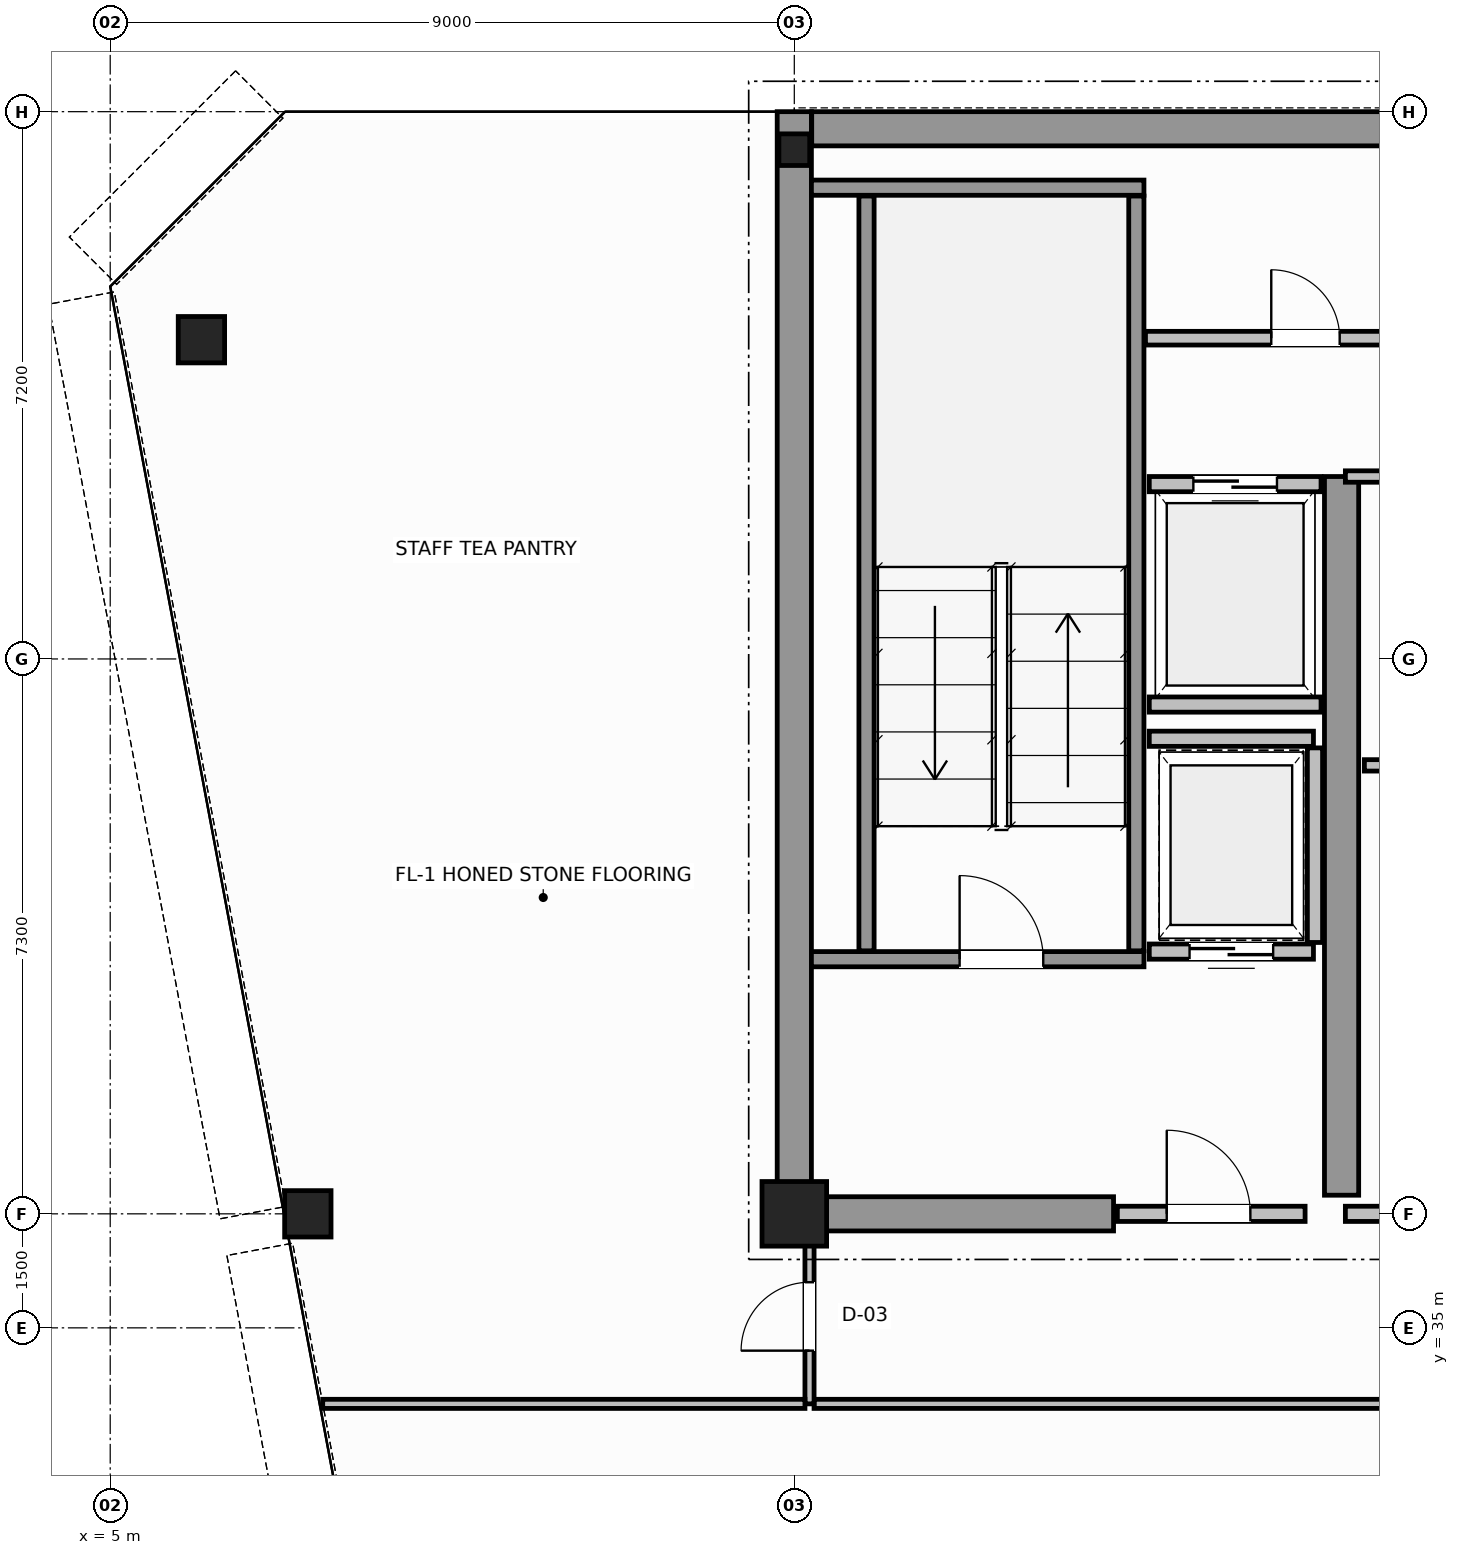
"""IFC4 building model, lengths in metres.
Left out: names, types, materials, properties, quantities, classifications, styles, units other than length and angle.
Written with IfcOpenShell. Run it as: python <this file> out.ifc"""

import sys

from ifc_helpers import new_model, si_unit, direction, frame, frame_2d, origin, origin_2d, place, context, subcontext, project, spatial, rectangle, hollow_circle, i_section, extrude, source, transform, mapped, element, fill, save


model = new_model("IFC4")
c1 = context("Model", 3, precision=1e-05, world=origin(), true_north=direction((0.0, 1.0)))
c2 = subcontext(c1, "Body", "Model", "MODEL_VIEW")
j1 = project(units=[si_unit("LENGTHUNIT", "METRE"), si_unit("PLANEANGLEUNIT", "RADIAN")], contexts=[c1])
p1 = place(None, origin())
s1 = spatial("IfcSite", under=j1, at=p1, CompositionType="ELEMENT")
p2 = place(p1, origin())
s2 = spatial("IfcBuilding", under=s1, at=p2, CompositionType="ELEMENT")
p3 = place(p2, frame((0.0, 0.0, 295.4)))
s3 = spatial("IfcBuildingStorey", under=s2, at=p3, CompositionType="ELEMENT", Elevation=295.4)
m1 = source(origin(), c2, "Body", "SweptSolid", [
    extrude(rectangle(XDim=0.85, YDim=0.85, at=origin_2d()), origin(), (0.0, 0.0, 1.0), 3.8),
])
p4 = place(p3, frame((14.0, 36.5, 0.0), z_axis=(0.0, 0.0, 1.0), x_axis=(1.0, 0.0, 0.0)))
e1 = element("IfcColumn", 1, at=p4, inside=s3, PredefinedType="COLUMN", context=c2, shape_type="MappedRepresentation", body=[
    mapped(m1, transform((0.0, 0.0, 0.0), scale=1.0)),
])
m2 = source(origin(), c2, "Body", "SweptSolid", [
    extrude(i_section(OverallWidth=0.406, OverallDepth=0.416, WebThickness=0.03, FlangeThickness=0.042, FilletRadius=0.015, at=origin_2d()), origin(), (0.0, 0.0, 1.0), 3.8),
])
p5 = place(p3, frame((14.0, 50.5, 0.0), z_axis=(0.0, 0.0, 1.0), x_axis=(1.0, 0.0, 0.0)))
e2 = element("IfcColumn", 2, at=p5, inside=s3, PredefinedType="COLUMN", context=c2, shape_type="MappedRepresentation", body=[
    mapped(m2, transform((0.0, 0.0, 0.0), scale=1.0)),
])
m3 = source(origin(), c2, "Body", "SweptSolid", [
    extrude(hollow_circle(Radius=0.305, WallThickness=0.03, at=origin_2d()), origin(), (0.0, 0.0, 1.0), 3.8),
])
for number, where, z_axis, x_axis in (
    (3, (6.2, 48.0, 0.0), (0.0, 0.0, 1.0), (1.0, 0.0, 0.0)),
    (4, (7.6, 36.5, 0.0), (0.0, 0.0, 1.0), (1.0, 0.0, 0.0)),
):
    element("IfcColumn", number, at=place(p3, frame(where, z_axis=z_axis, x_axis=x_axis)), inside=s3, PredefinedType="COLUMN", context=c2, shape_type="MappedRepresentation", body=[
        mapped(m3, transform((0.0, 0.0, 0.0), scale=1.0)),
    ])
p6 = place(p3, frame((14.229, 50.775, 0.0), z_axis=(0.0, 0.0, 1.0), x_axis=(1.0, 0.0, 0.0)))
e5 = element("IfcWall", 5, at=p6, inside=s3, PredefinedType="SHEAR", context=c2, shape_type="SweptSolid", body=[
    extrude(rectangle(XDim=19.769, YDim=0.45, at=frame_2d((9.885, 0.0))), origin(), (0.0, 0.0, 1.0), 3.8),
])
p7 = place(p3, frame((14.0, 36.5, 0.0), z_axis=(0.0, 0.0, 1.0), x_axis=(0.0, 1.0, 0.0)))
e6 = element("IfcWall", 6, at=p7, inside=s3, PredefinedType="SHEAR", context=c2, shape_type="SweptSolid", body=[
    extrude(rectangle(XDim=14.5, YDim=0.45, at=frame_2d((7.25, 0.0))), origin(), (0.0, 0.0, 1.0), 3.8),
])
p8 = place(p3, frame((14.245, 36.5, 0.0), z_axis=(0.0, 0.0, 1.0), x_axis=(1.0, 0.0, 0.0)))
e7 = element("IfcWall", 7, at=p8, inside=s3, PredefinedType="SHEAR", context=c2, shape_type="SweptSolid", body=[
    extrude(rectangle(XDim=3.955, YDim=0.45, at=frame_2d((1.978, 0.0))), origin(), (0.0, 0.0, 1.0), 2.58),
])
p9 = place(p3, frame((21.2, 36.745, 0.0), z_axis=(0.0, 0.0, 1.0), x_axis=(0.0, 1.0, 0.0)))
e8 = element("IfcWall", 8, at=p9, inside=s3, PredefinedType="SHEAR", context=c2, shape_type="SweptSolid", body=[
    extrude(rectangle(XDim=9.455, YDim=0.45, at=frame_2d((4.728, 0.0))), origin(), (0.0, 0.0, 1.0), 3.8),
])
p10 = place(p3, frame((14.225, 39.85, 0.0), z_axis=(0.0, 0.0, 1.0), x_axis=(1.0, 0.0, 0.0)))
e9 = element("IfcWall", 9, at=p10, inside=s3, PredefinedType="SOLIDWALL", context=c2, shape_type="SweptSolid", body=[
    extrude(rectangle(XDim=4.375, YDim=0.2, at=frame_2d((2.188, 0.0))), origin(), (0.0, 0.0, 1.0), 3.8),
])
p11 = place(p10, frame((1.95, 0.0, 0.0)))
e10 = element("IfcOpeningElement", 10, at=p11, cuts=e9, PredefinedType="OPENING", context=c2, shape_type="SweptSolid", body=[
    extrude(rectangle(XDim=1.1, YDim=2.15, at=frame_2d((0.55, 1.075))), frame((0.0, 0.11, 0.0), z_axis=(0.0, -1.0, 0.0), x_axis=(1.0, 0.0, 0.0)), (0.0, 0.0, 1.0), 0.22),
])
p12 = place(p3, frame((14.225, 50.0, 0.0), z_axis=(0.0, 0.0, 1.0), x_axis=(1.0, 0.0, 0.0)))
e11 = element("IfcWall", 11, at=p12, inside=s3, PredefinedType="SOLIDWALL", context=c2, shape_type="SweptSolid", body=[
    extrude(rectangle(XDim=4.375, YDim=0.2, at=frame_2d((2.188, 0.0))), origin(), (0.0, 0.0, 1.0), 3.8),
])
for number, where, z_axis, x_axis in (
    (12, (14.95, 39.96, 0.0), (0.0, 0.0, 1.0), (0.0, 1.0, 0.0)),
    (13, (18.5, 39.96, 0.0), (0.0, 0.0, 1.0), (0.0, 1.0, 0.0)),
):
    element("IfcWall", number, at=place(p3, frame(where, z_axis=z_axis, x_axis=x_axis)), inside=s3, PredefinedType="SOLIDWALL", context=c2, shape_type="SweptSolid", body=[
        extrude(rectangle(XDim=9.93, YDim=0.2, at=frame_2d((4.965, 0.0))), origin(), (0.0, 0.0, 1.0), 3.8),
    ])
p13 = place(p3, frame((18.25, 36.5, 0.0), z_axis=(0.0, 0.0, 1.0), x_axis=(1.0, 0.0, 0.0)))
e14 = element("IfcWall", 14, at=p13, inside=s3, PredefinedType="SOLIDWALL", context=c2, shape_type="SweptSolid", body=[
    extrude(rectangle(XDim=2.47, YDim=0.2, at=frame_2d((1.235, 0.0))), origin(), (0.0, 0.0, 1.0), 2.57),
])
p14 = place(p13, frame((0.65, 0.0, 0.0)))
e15 = element("IfcOpeningElement", 15, at=p14, cuts=e14, PredefinedType="OPENING", context=c2, shape_type="SweptSolid", body=[
    extrude(rectangle(XDim=1.1, YDim=2.15, at=frame_2d((0.55, 1.075))), frame((0.0, 0.11, 0.0), z_axis=(0.0, -1.0, 0.0), x_axis=(1.0, 0.0, 0.0)), (0.0, 0.0, 1.0), 0.22),
])
p15 = place(p3, frame((18.67, 46.1, 0.0), z_axis=(0.0, 0.0, 1.0), x_axis=(1.0, 0.0, 0.0)))
e16 = element("IfcWall", 16, at=p15, inside=s3, PredefinedType="SOLIDWALL", context=c2, shape_type="SweptSolid", body=[
    extrude(rectangle(XDim=2.26, YDim=0.2, at=frame_2d((1.13, 0.0))), origin(), (0.0, 0.0, 1.0), 3.58),
])
p16 = place(p15, frame((0.58, 0.0, 0.0)))
e17 = element("IfcOpeningElement", 17, at=p16, cuts=e16, PredefinedType="OPENING", context=c2, shape_type="SweptSolid", body=[
    extrude(rectangle(XDim=1.1, YDim=2.15, at=frame_2d((0.55, 1.075))), frame((0.0, 0.11, 0.0), z_axis=(0.0, -1.0, 0.0), x_axis=(1.0, 0.0, 0.0)), (0.0, 0.0, 1.0), 0.22),
])
p17 = place(p3, frame((18.67, 43.2, 0.0), z_axis=(0.0, 0.0, 1.0), x_axis=(1.0, 0.0, 0.0)))
e18 = element("IfcWall", 18, at=p17, inside=s3, PredefinedType="SOLIDWALL", context=c2, shape_type="SweptSolid", body=[
    extrude(rectangle(XDim=2.26, YDim=0.2, at=frame_2d((1.13, 0.0))), origin(), (0.0, 0.0, 1.0), 3.58),
])
p18 = place(p3, frame((18.67, 39.95, 0.0), z_axis=(0.0, 0.0, 1.0), x_axis=(1.0, 0.0, 0.0)))
e19 = element("IfcWall", 19, at=p18, inside=s3, PredefinedType="SOLIDWALL", context=c2, shape_type="SweptSolid", body=[
    extrude(rectangle(XDim=2.16, YDim=0.2, at=frame_2d((1.08, 0.0))), origin(), (0.0, 0.0, 1.0), 3.58),
])
p19 = place(p18, frame((0.53, 0.0, 0.0)))
e20 = element("IfcOpeningElement", 20, at=p19, cuts=e19, PredefinedType="OPENING", context=c2, shape_type="SweptSolid", body=[
    extrude(rectangle(XDim=1.1, YDim=2.15, at=frame_2d((0.55, 1.075))), frame((0.0, 0.11, 0.0), z_axis=(0.0, -1.0, 0.0), x_axis=(1.0, 0.0, 0.0)), (0.0, 0.0, 1.0), 0.22),
])
p20 = place(p3, frame((18.67, 42.75, 0.0), z_axis=(0.0, 0.0, 1.0), x_axis=(1.0, 0.0, 0.0)))
e21 = element("IfcWall", 21, at=p20, inside=s3, PredefinedType="SOLIDWALL", context=c2, shape_type="SweptSolid", body=[
    extrude(rectangle(XDim=2.16, YDim=0.2, at=frame_2d((1.08, 0.0))), origin(), (0.0, 0.0, 1.0), 3.58),
])
p21 = place(p3, frame((20.85, 40.07, 0.0), z_axis=(0.0, 0.0, 1.0), x_axis=(0.0, 1.0, 0.0)))
e22 = element("IfcWall", 22, at=p21, inside=s3, PredefinedType="SOLIDWALL", context=c2, shape_type="SweptSolid", body=[
    extrude(rectangle(XDim=2.56, YDim=0.2, at=frame_2d((1.28, 0.0))), origin(), (0.0, 0.0, 1.0), 3.58),
])
p22 = place(p3, frame((21.25, 36.5, 0.0), z_axis=(0.0, 0.0, 1.0), x_axis=(1.0, 0.0, 0.0)))
e23 = element("IfcWall", 23, at=p22, inside=s3, PredefinedType="SOLIDWALL", context=c2, shape_type="SweptSolid", body=[
    extrude(rectangle(XDim=6.27, YDim=0.2, at=frame_2d((3.135, 0.0))), origin(), (0.0, 0.0, 1.0), 2.57),
])
p23 = place(p22, frame((2.6, 0.0, 0.0)))
e24 = element("IfcOpeningElement", 24, at=p23, cuts=e23, PredefinedType="OPENING", context=c2, shape_type="SweptSolid", body=[
    extrude(rectangle(XDim=1.1, YDim=2.15, at=frame_2d((0.55, 1.075))), frame((0.0, 0.11, 0.0), z_axis=(0.0, -1.0, 0.0), x_axis=(1.0, 0.0, 0.0)), (0.0, 0.0, 1.0), 0.22),
])
p24 = place(p3, frame((21.25, 46.2, 0.0), z_axis=(0.0, 0.0, 1.0), x_axis=(1.0, 0.0, 0.0)))
e25 = element("IfcWall", 25, at=p24, inside=s3, PredefinedType="PARTITIONING", context=c2, shape_type="SweptSolid", body=[
    extrude(rectangle(XDim=8.5, YDim=0.15, at=frame_2d((4.25, 0.0))), origin(), (0.0, 0.0, 1.0), 3.58),
])
p25 = place(p3, frame((21.5, 42.4, 0.0), z_axis=(0.0, 0.0, 1.0), x_axis=(1.0, 0.0, 0.0)))
e26 = element("IfcWall", 26, at=p25, inside=s3, PredefinedType="PARTITIONING", context=c2, shape_type="SweptSolid", body=[
    extrude(rectangle(XDim=8.0, YDim=0.15, at=frame_2d((4.0, 0.0))), origin(), (0.0, 0.0, 1.0), 3.58),
])
p26 = place(p25, frame((3.4, 0.0, 0.0)))
e27 = element("IfcOpeningElement", 27, at=p26, cuts=e26, PredefinedType="OPENING", context=c2, shape_type="SweptSolid", body=[
    extrude(rectangle(XDim=0.9, YDim=2.1, at=frame_2d((0.45, 1.05))), frame((0.0, 0.085, 0.0), z_axis=(0.0, -1.0, 0.0), x_axis=(1.0, 0.0, 0.0)), (0.0, 0.0, 1.0), 0.17),
])
p27 = place(p3, frame((18.62, 48.02, 0.0), z_axis=(0.0, 0.0, 1.0), x_axis=(1.0, 0.0, 0.0)))
e28 = element("IfcWall", 28, at=p27, inside=s3, PredefinedType="PLUMBINGWALL", context=c2, shape_type="SweptSolid", body=[
    extrude(rectangle(XDim=30.76, YDim=0.18, at=frame_2d((15.38, 0.0))), origin(), (0.0, 0.0, 1.0), 3.58),
])
p28 = place(p27, frame((1.655, 0.0, 0.0)))
e29 = element("IfcOpeningElement", 29, at=p28, cuts=e28, PredefinedType="OPENING", context=c2, shape_type="SweptSolid", body=[
    extrude(rectangle(XDim=0.9, YDim=2.15, at=frame_2d((0.45, 1.075))), frame((0.0, 0.1, 0.0), z_axis=(0.0, -1.0, 0.0), x_axis=(1.0, 0.0, 0.0)), (0.0, 0.0, 1.0), 0.2),
])
p29 = place(p27, frame((6.03, 0.0, 0.0)))
e30 = element("IfcOpeningElement", 30, at=p29, cuts=e28, PredefinedType="OPENING", context=c2, shape_type="SweptSolid", body=[
    extrude(rectangle(XDim=0.9, YDim=2.15, at=frame_2d((0.45, 1.075))), frame((0.0, 0.1, 0.0), z_axis=(0.0, -1.0, 0.0), x_axis=(1.0, 0.0, 0.0)), (0.0, 0.0, 1.0), 0.2),
])
p30 = place(p27, frame((10.93, 0.0, 0.0)))
e31 = element("IfcOpeningElement", 31, at=p30, cuts=e28, PredefinedType="OPENING", context=c2, shape_type="SweptSolid", body=[
    extrude(rectangle(XDim=0.9, YDim=2.15, at=frame_2d((0.45, 1.075))), frame((0.0, 0.1, 0.0), z_axis=(0.0, -1.0, 0.0), x_axis=(1.0, 0.0, 0.0)), (0.0, 0.0, 1.0), 0.2),
])
p31 = place(p27, frame((16.13, 0.0, 0.0)))
e32 = element("IfcOpeningElement", 32, at=p31, cuts=e28, PredefinedType="OPENING", context=c2, shape_type="SweptSolid", body=[
    extrude(rectangle(XDim=0.9, YDim=2.15, at=frame_2d((0.45, 1.075))), frame((0.0, 0.1, 0.0), z_axis=(0.0, -1.0, 0.0), x_axis=(1.0, 0.0, 0.0)), (0.0, 0.0, 1.0), 0.2),
])
p32 = place(p27, frame((21.73, 0.0, 0.0)))
e33 = element("IfcOpeningElement", 33, at=p32, cuts=e28, PredefinedType="OPENING", context=c2, shape_type="SweptSolid", body=[
    extrude(rectangle(XDim=0.9, YDim=2.15, at=frame_2d((0.45, 1.075))), frame((0.0, 0.1, 0.0), z_axis=(0.0, -1.0, 0.0), x_axis=(1.0, 0.0, 0.0)), (0.0, 0.0, 1.0), 0.2),
])
p33 = place(p27, frame((27.505, 0.0, 0.0)))
e34 = element("IfcOpeningElement", 34, at=p33, cuts=e28, PredefinedType="OPENING", context=c2, shape_type="SweptSolid", body=[
    extrude(rectangle(XDim=0.9, YDim=2.15, at=frame_2d((0.45, 1.075))), frame((0.0, 0.1, 0.0), z_axis=(0.0, -1.0, 0.0), x_axis=(1.0, 0.0, 0.0)), (0.0, 0.0, 1.0), 0.2),
])
p34 = place(p3, frame((14.26, 34.0, 0.0), z_axis=(0.0, 0.0, 1.0), x_axis=(1.0, 0.0, 0.0)))
e35 = element("IfcWall", 35, at=p34, inside=s3, PredefinedType="PARTITIONING", context=c2, shape_type="SweptSolid", body=[
    extrude(rectangle(XDim=20.68, YDim=0.12, at=frame_2d((10.34, 0.0))), origin(), (0.0, 0.0, 1.0), 3.21),
])
p35 = place(p3, frame((14.2, 34.0, 0.0), z_axis=(0.0, 0.0, 1.0), x_axis=(0.0, 1.0, 0.0)))
e36 = element("IfcWall", 36, at=p35, inside=s3, PredefinedType="PARTITIONING", context=c2, shape_type="SweptSolid", body=[
    extrude(rectangle(XDim=2.44, YDim=0.12, at=frame_2d((1.22, 0.0))), origin(), (0.0, 0.0, 1.0), 3.58),
])
p36 = place(p35, frame((0.7, 0.0, 0.0)))
e37 = element("IfcOpeningElement", 37, at=p36, cuts=e36, PredefinedType="OPENING", context=c2, shape_type="SweptSolid", body=[
    extrude(rectangle(XDim=0.9, YDim=2.15, at=frame_2d((0.45, 1.075))), frame((0.0, 0.07, 0.0), z_axis=(0.0, -1.0, 0.0), x_axis=(1.0, 0.0, 0.0)), (0.0, 0.0, 1.0), 0.14),
])
p37 = place(p3, frame((7.796, 34.0, 0.0), z_axis=(0.0, 0.0, 1.0), x_axis=(1.0, 0.0, 0.0)))
e38 = element("IfcWall", 38, at=p37, inside=s3, PredefinedType="PARTITIONING", context=c2, shape_type="SweptSolid", body=[
    extrude(rectangle(XDim=6.344, YDim=0.12, at=frame_2d((3.172, 0.0))), origin(), (0.0, 0.0, 1.0), 3.21),
])
m4 = source(origin(), c2, "Body", "SweptSolid", [
    extrude(rectangle(XDim=1.1, YDim=2.15, at=frame_2d((0.55, 1.075))), frame((0.0, 0.025, 0.0), z_axis=(0.0, -1.0, 0.0), x_axis=(1.0, 0.0, 0.0)), (0.0, 0.0, 1.0), 0.05),
])
p38 = place(p11, origin())
e39 = element("IfcDoor", 39, at=p38, inside=s3, OperationType="SINGLE_SWING_LEFT", PredefinedType="DOOR", context=c2, shape_type="MappedRepresentation", body=[
    mapped(m4, transform((0.0, 0.0, 0.0), scale=1.0)),
])
fill(e10, e39)
p39 = place(p14, origin())
e40 = element("IfcDoor", 40, at=p39, inside=s3, OperationType="SINGLE_SWING_RIGHT", PredefinedType="DOOR", context=c2, shape_type="MappedRepresentation", body=[
    mapped(m4, transform((0.0, 0.0, 0.0), scale=1.0)),
])
fill(e15, e40)
p40 = place(p16, origin())
e41 = element("IfcDoor", 41, at=p40, inside=s3, OperationType="DOUBLE_DOOR_SLIDING", PredefinedType="DOOR", context=c2, shape_type="MappedRepresentation", body=[
    mapped(m4, transform((0.0, 0.0, 0.0), scale=1.0)),
])
fill(e17, e41)
p41 = place(p19, origin())
e42 = element("IfcDoor", 42, at=p41, inside=s3, OperationType="DOUBLE_DOOR_SLIDING", PredefinedType="DOOR", context=c2, shape_type="MappedRepresentation", body=[
    mapped(m4, transform((0.0, 0.0, 0.0), scale=1.0)),
])
fill(e20, e42)
m5 = source(origin(), c2, "Body", "SweptSolid", [
    extrude(rectangle(XDim=0.9, YDim=2.15, at=frame_2d((0.45, 1.075))), frame((0.0, 0.025, 0.0), z_axis=(0.0, -1.0, 0.0), x_axis=(1.0, 0.0, 0.0)), (0.0, 0.0, 1.0), 0.05),
])
p42 = place(p28, origin())
e43 = element("IfcDoor", 43, at=p42, inside=s3, OperationType="SINGLE_SWING_LEFT", PredefinedType="DOOR", context=c2, shape_type="MappedRepresentation", body=[
    mapped(m5, transform((0.0, 0.0, 0.0), scale=1.0)),
])
fill(e29, e43)
p43 = place(p36, origin())
e44 = element("IfcDoor", 44, at=p43, inside=s3, OperationType="SINGLE_SWING_LEFT", PredefinedType="DOOR", context=c2, shape_type="MappedRepresentation", body=[
    mapped(m5, transform((0.0, 0.0, 0.0), scale=1.0)),
])
fill(e37, e44)
save(model, sys.argv[1])
